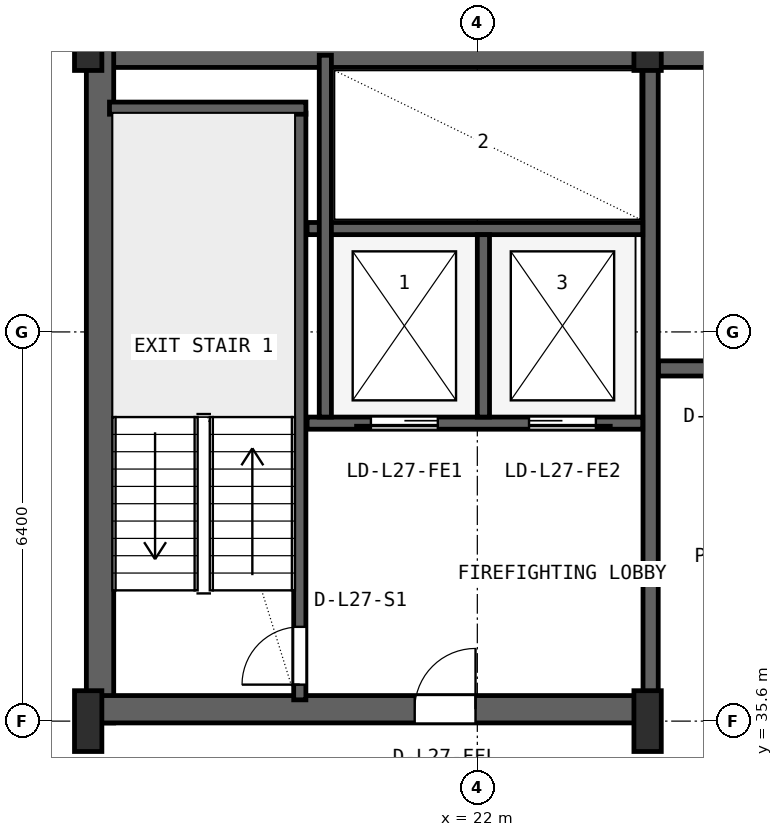
"""IFC4 building model, lengths in metres.
Left out: names, types, materials, properties, quantities, classifications, styles, units other than length and angle.
Written with IfcOpenShell. Run it as: python <this file> out.ifc"""

import sys

from ifc_helpers import new_model, si_unit, direction, frame, frame_2d, origin, origin_2d, place, context, subcontext, project, spatial, rectangle, i_section, extrude, source, transform, mapped, element, fill, save


model = new_model("IFC4")
c1 = context("Model", 3, precision=1e-05, world=origin(), true_north=direction((0.0, 1.0)))
c2 = subcontext(c1, "Body", "Model", "MODEL_VIEW")
j1 = project(units=[si_unit("LENGTHUNIT", "METRE"), si_unit("PLANEANGLEUNIT", "RADIAN")], contexts=[c1])
p1 = place(None, origin())
s1 = spatial("IfcSite", under=j1, at=p1, CompositionType="ELEMENT")
p2 = place(p1, origin())
s2 = spatial("IfcBuilding", under=s1, at=p2, CompositionType="ELEMENT")
p3 = place(p2, frame((0.0, 0.0, 114.4)))
s3 = spatial("IfcBuildingStorey", under=s2, at=p3, CompositionType="ELEMENT", Elevation=114.4)
p4 = place(p3, frame((15.6, 46.575, 0.0), z_axis=(0.0, 0.0, 1.0), x_axis=(1.0, 0.0, 0.0)))
e1 = element("IfcWall", 1, at=p4, inside=s3, PredefinedType="SHEAR", context=c2, shape_type="SweptSolid", body=[
    extrude(rectangle(XDim=36.8, YDim=0.45, at=frame_2d((18.4, 0.0))), origin(), (0.0, 0.0, 1.0), 3.55),
])
p5 = place(p3, frame((15.795, 35.57, 0.0), z_axis=(0.0, 0.0, 1.0), x_axis=(0.0, 1.0, 0.0)))
e2 = element("IfcWall", 2, at=p5, inside=s3, PredefinedType="SHEAR", context=c2, shape_type="SweptSolid", body=[
    extrude(rectangle(XDim=11.23, YDim=0.45, at=frame_2d((5.615, 0.0))), origin(), (0.0, 0.0, 1.0), 3.55),
])
p6 = place(p3, frame((15.57, 35.795, 0.0), z_axis=(0.0, 0.0, 1.0), x_axis=(1.0, 0.0, 0.0)))
e3 = element("IfcWall", 3, at=p6, inside=s3, PredefinedType="SHEAR", context=c2, shape_type="SweptSolid", body=[
    extrude(rectangle(XDim=9.23, YDim=0.45, at=frame_2d((4.615, 0.0))), origin(), (0.0, 0.0, 1.0), 3.55),
])
p7 = place(p6, frame((5.4, 0.0, 0.0)))
e4 = element("IfcOpeningElement", 4, at=p7, cuts=e3, PredefinedType="OPENING", context=c2, shape_type="SweptSolid", body=[
    extrude(rectangle(XDim=1.0, YDim=2.1, at=frame_2d((0.5, 1.05))), frame((0.0, 0.235, 0.0), z_axis=(0.0, -1.0, 0.0), x_axis=(1.0, 0.0, 0.0)), (0.0, 0.0, 1.0), 0.47),
])
m1 = source(origin(), c2, "Body", "SweptSolid", [
    extrude(i_section(OverallWidth=0.45, OverallDepth=1.0, WebThickness=0.016, FlangeThickness=0.03, FilletRadius=0.016, at=origin_2d()), origin(), (0.0, 0.0, 1.0), 3.8),
])
for number, where, z_axis, x_axis in (
    (5, (15.6, 35.6, 0.0), (0.0, 0.0, 1.0), (1.0, 0.0, 0.0)),
    (6, (15.6, 46.8, 0.0), (0.0, 0.0, 1.0), (1.0, 0.0, 0.0)),
    (7, (24.8, 35.6, 0.0), (0.0, 0.0, 1.0), (1.0, 0.0, 0.0)),
    (8, (24.8, 46.8, 0.0), (0.0, 0.0, 1.0), (1.0, 0.0, 0.0)),
):
    element("IfcColumn", number, at=place(p3, frame(where, z_axis=z_axis, x_axis=x_axis)), inside=s3, PredefinedType="COLUMN", context=c2, shape_type="MappedRepresentation", body=[
        mapped(m1, transform((0.0, 0.0, 0.0), x_axis=(1.0, 0.0, 0.0), y_axis=(0.0, 1.0, 0.0), z_axis=(0.0, 0.0, 1.0), scale=1.0)),
    ])
p8 = place(p3, frame((19.08, 35.95, 0.0), z_axis=(0.0, 0.0, 1.0), x_axis=(0.0, 1.0, 0.0)))
e9 = element("IfcWall", 9, at=p8, inside=s3, PredefinedType="SHEAR", context=c2, shape_type="SweptSolid", body=[
    extrude(rectangle(XDim=9.65, YDim=0.2, at=frame_2d((4.825, 0.0))), origin(), (0.0, 0.0, 1.0), 3.55),
])
p9 = place(p8, frame((0.25, 0.0, 0.0)))
e10 = element("IfcOpeningElement", 10, at=p9, cuts=e9, PredefinedType="OPENING", context=c2, shape_type="SweptSolid", body=[
    extrude(rectangle(XDim=0.95, YDim=2.1, at=frame_2d((0.475, 1.05))), frame((0.0, 0.11, 0.0), z_axis=(0.0, -1.0, 0.0), x_axis=(1.0, 0.0, 0.0)), (0.0, 0.0, 1.0), 0.22),
])
p10 = place(p3, frame((15.95, 45.68, 0.0), z_axis=(0.0, 0.0, 1.0), x_axis=(1.0, 0.0, 0.0)))
e11 = element("IfcWall", 11, at=p10, inside=s3, PredefinedType="SHEAR", context=c2, shape_type="SweptSolid", body=[
    extrude(rectangle(XDim=3.23, YDim=0.2, at=frame_2d((1.615, 0.0))), origin(), (0.0, 0.0, 1.0), 3.55),
])
p11 = place(p3, frame((24.85, 36.05, 0.0), z_axis=(0.0, 0.0, 1.0), x_axis=(0.0, 1.0, 0.0)))
e12 = element("IfcWall", 12, at=p11, inside=s3, PredefinedType="SHEAR", context=c2, shape_type="SweptSolid", body=[
    extrude(rectangle(XDim=10.45, YDim=0.25, at=frame_2d((5.225, 0.0))), origin(), (0.0, 0.0, 1.0), 3.55),
])
p12 = place(p3, frame((19.2, 40.5, 0.0), z_axis=(0.0, 0.0, 1.0), x_axis=(1.0, 0.0, 0.0)))
e13 = element("IfcWall", 13, at=p12, inside=s3, PredefinedType="SHEAR", context=c2, shape_type="SweptSolid", body=[
    extrude(rectangle(XDim=5.52, YDim=0.2, at=frame_2d((2.76, 0.0))), origin(), (0.0, 0.0, 1.0), 3.55),
])
p13 = place(p12, frame((1.05, 0.0, 0.0)))
e14 = element("IfcOpeningElement", 14, at=p13, cuts=e13, PredefinedType="OPENING", context=c2, shape_type="SweptSolid", body=[
    extrude(rectangle(XDim=1.1, YDim=2.18, at=frame_2d((0.55, 1.09))), frame((0.0, 0.11, 0.0), z_axis=(0.0, -1.0, 0.0), x_axis=(1.0, 0.0, 0.0)), (0.0, 0.0, 1.0), 0.22),
])
p14 = place(p12, frame((3.65, 0.0, 0.0)))
e15 = element("IfcOpeningElement", 15, at=p14, cuts=e13, PredefinedType="OPENING", context=c2, shape_type="SweptSolid", body=[
    extrude(rectangle(XDim=1.1, YDim=2.18, at=frame_2d((0.55, 1.09))), frame((0.0, 0.11, 0.0), z_axis=(0.0, -1.0, 0.0), x_axis=(1.0, 0.0, 0.0)), (0.0, 0.0, 1.0), 0.22),
])
p15 = place(p3, frame((19.2, 43.7, 0.0), z_axis=(0.0, 0.0, 1.0), x_axis=(1.0, 0.0, 0.0)))
e16 = element("IfcWall", 16, at=p15, inside=s3, PredefinedType="SHEAR", context=c2, shape_type="SweptSolid", body=[
    extrude(rectangle(XDim=5.52, YDim=0.2, at=frame_2d((2.76, 0.0))), origin(), (0.0, 0.0, 1.0), 3.55),
])
p16 = place(p3, frame((22.1, 40.6, 0.0), z_axis=(0.0, 0.0, 1.0), x_axis=(0.0, 1.0, 0.0)))
e17 = element("IfcWall", 17, at=p16, inside=s3, PredefinedType="SHEAR", context=c2, shape_type="SweptSolid", body=[
    extrude(rectangle(XDim=3.0, YDim=0.2, at=frame_2d((1.5, 0.0))), origin(), (0.0, 0.0, 1.0), 3.55),
])
p17 = place(p3, frame((19.5, 40.6, 0.0), z_axis=(0.0, 0.0, 1.0), x_axis=(0.0, 1.0, 0.0)))
e18 = element("IfcWall", 18, at=p17, inside=s3, PredefinedType="SHEAR", context=c2, shape_type="SweptSolid", body=[
    extrude(rectangle(XDim=5.95, YDim=0.2, at=frame_2d((2.975, 0.0))), origin(), (0.0, 0.0, 1.0), 3.55),
])
p18 = place(p3, frame((24.98, 41.4, 0.0), z_axis=(0.0, 0.0, 1.0), x_axis=(1.0, 0.0, 0.0)))
e19 = element("IfcWall", 19, at=p18, inside=s3, PredefinedType="SHEAR", context=c2, shape_type="SweptSolid", body=[
    extrude(rectangle(XDim=23.82, YDim=0.25, at=frame_2d((11.91, 0.0))), origin(), (0.0, 0.0, 1.0), 3.55),
])
p19 = place(p18, frame((8.87, 0.0, 0.0)))
e20 = element("IfcOpeningElement", 20, at=p19, cuts=e19, PredefinedType="OPENING", context=c2, shape_type="SweptSolid", body=[
    extrude(rectangle(XDim=1.1, YDim=2.18, at=frame_2d((0.55, 1.09))), frame((0.0, 0.135, 0.0), z_axis=(0.0, -1.0, 0.0), x_axis=(1.0, 0.0, 0.0)), (0.0, 0.0, 1.0), 0.27),
])
p20 = place(p18, frame((11.47, 0.0, 0.0)))
e21 = element("IfcOpeningElement", 21, at=p20, cuts=e19, PredefinedType="OPENING", context=c2, shape_type="SweptSolid", body=[
    extrude(rectangle(XDim=1.1, YDim=2.18, at=frame_2d((0.55, 1.09))), frame((0.0, 0.135, 0.0), z_axis=(0.0, -1.0, 0.0), x_axis=(1.0, 0.0, 0.0)), (0.0, 0.0, 1.0), 0.27),
])
p21 = place(p18, frame((14.07, 0.0, 0.0)))
e22 = element("IfcOpeningElement", 22, at=p21, cuts=e19, PredefinedType="OPENING", context=c2, shape_type="SweptSolid", body=[
    extrude(rectangle(XDim=1.1, YDim=2.18, at=frame_2d((0.55, 1.09))), frame((0.0, 0.135, 0.0), z_axis=(0.0, -1.0, 0.0), x_axis=(1.0, 0.0, 0.0)), (0.0, 0.0, 1.0), 0.27),
])
p22 = place(p18, frame((0.96, 0.0, 0.0)))
e23 = element("IfcOpeningElement", 23, at=p22, cuts=e19, PredefinedType="OPENING", context=c2, shape_type="SweptSolid", body=[
    extrude(rectangle(XDim=1.0, YDim=2.08, at=frame_2d((0.5, 1.04))), frame((0.0, 0.135, 0.0), z_axis=(0.0, -1.0, 0.0), x_axis=(1.0, 0.0, 0.0)), (0.0, 0.0, 1.0), 0.27),
])
p23 = place(p18, frame((3.56, 0.0, 0.0)))
e24 = element("IfcOpeningElement", 24, at=p23, cuts=e19, PredefinedType="OPENING", context=c2, shape_type="SweptSolid", body=[
    extrude(rectangle(XDim=1.0, YDim=2.08, at=frame_2d((0.5, 1.04))), frame((0.0, 0.135, 0.0), z_axis=(0.0, -1.0, 0.0), x_axis=(1.0, 0.0, 0.0)), (0.0, 0.0, 1.0), 0.27),
])
p24 = place(p18, frame((6.16, 0.0, 0.0)))
e25 = element("IfcOpeningElement", 25, at=p24, cuts=e19, PredefinedType="OPENING", context=c2, shape_type="SweptSolid", body=[
    extrude(rectangle(XDim=0.92, YDim=2.08, at=frame_2d((0.46, 1.04))), frame((0.0, 0.135, 0.0), z_axis=(0.0, -1.0, 0.0), x_axis=(1.0, 0.0, 0.0)), (0.0, 0.0, 1.0), 0.27),
])
m2 = source(origin(), c2, "Body", "SweptSolid", [
    extrude(rectangle(XDim=0.95, YDim=2.1, at=frame_2d((0.475, 1.05))), frame((0.0, 0.025, 0.0), z_axis=(0.0, -1.0, 0.0), x_axis=(1.0, 0.0, 0.0)), (0.0, 0.0, 1.0), 0.05),
])
p25 = place(p9, origin())
e26 = element("IfcDoor", 26, at=p25, inside=s3, OperationType="SINGLE_SWING_LEFT", PredefinedType="DOOR", context=c2, shape_type="MappedRepresentation", body=[
    mapped(m2, transform((0.0, 0.0, 0.0), x_axis=(1.0, 0.0, 0.0), y_axis=(0.0, 1.0, 0.0), z_axis=(0.0, 0.0, 1.0), scale=1.0)),
])
fill(e10, e26)
m3 = source(origin(), c2, "Body", "SweptSolid", [
    extrude(rectangle(XDim=1.0, YDim=2.1, at=frame_2d((0.5, 1.05))), frame((0.0, 0.025, 0.0), z_axis=(0.0, -1.0, 0.0), x_axis=(1.0, 0.0, 0.0)), (0.0, 0.0, 1.0), 0.05),
])
p26 = place(p7, origin())
e27 = element("IfcDoor", 27, at=p26, inside=s3, OperationType="SINGLE_SWING_RIGHT", PredefinedType="DOOR", context=c2, shape_type="MappedRepresentation", body=[
    mapped(m3, transform((0.0, 0.0, 0.0), x_axis=(1.0, 0.0, 0.0), y_axis=(0.0, 1.0, 0.0), z_axis=(0.0, 0.0, 1.0), scale=1.0)),
])
fill(e4, e27)
m4 = source(origin(), c2, "Body", "SweptSolid", [
    extrude(rectangle(XDim=1.1, YDim=2.18, at=frame_2d((0.55, 1.09))), frame((0.0, 0.025, 0.0), z_axis=(0.0, -1.0, 0.0), x_axis=(1.0, 0.0, 0.0)), (0.0, 0.0, 1.0), 0.05),
])
p27 = place(p13, frame((1.1, 0.0, 0.0), z_axis=(0.0, 0.0, 1.0), x_axis=(-1.0, 0.0, 0.0)))
e28 = element("IfcDoor", 28, at=p27, inside=s3, OperationType="SLIDING_TO_LEFT", PredefinedType="DOOR", context=c2, shape_type="MappedRepresentation", body=[
    mapped(m4, transform((0.0, 0.0, 0.0), x_axis=(1.0, 0.0, 0.0), y_axis=(0.0, 1.0, 0.0), z_axis=(0.0, 0.0, 1.0), scale=1.0)),
])
fill(e14, e28)
p28 = place(p14, frame((1.1, 0.0, 0.0), z_axis=(0.0, 0.0, 1.0), x_axis=(-1.0, 0.0, 0.0)))
e29 = element("IfcDoor", 29, at=p28, inside=s3, OperationType="SLIDING_TO_RIGHT", PredefinedType="DOOR", context=c2, shape_type="MappedRepresentation", body=[
    mapped(m4, transform((0.0, 0.0, 0.0), x_axis=(1.0, 0.0, 0.0), y_axis=(0.0, 1.0, 0.0), z_axis=(0.0, 0.0, 1.0), scale=1.0)),
])
fill(e15, e29)
save(model, sys.argv[1])
